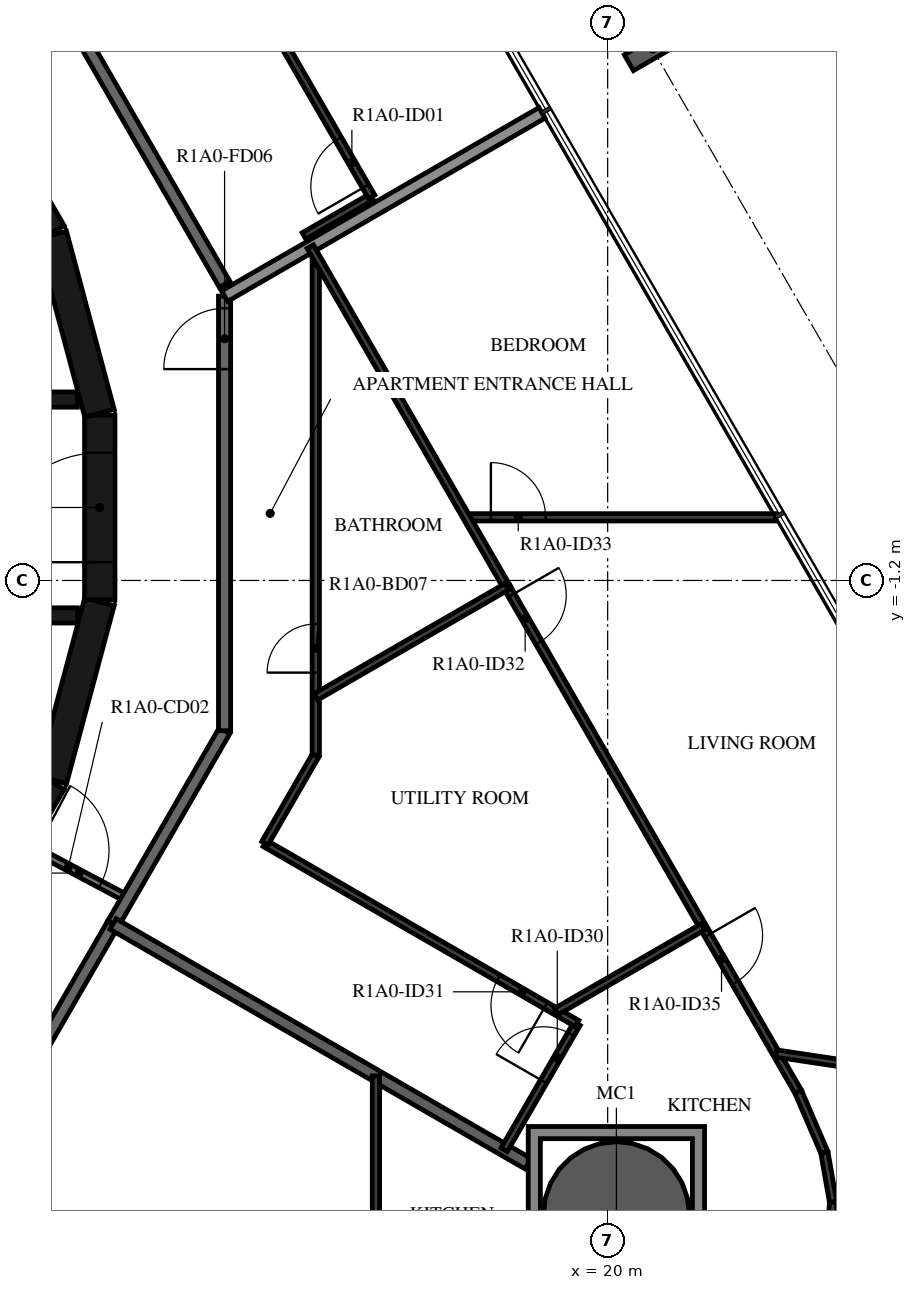
"""IFC4 building model, lengths in metres.
Left out: names, types, materials, properties, quantities, classifications, styles, units other than length and angle.
Written with IfcOpenShell. Run it as: python <this file> out.ifc"""

import sys

from ifc_helpers import new_model, si_unit, direction, frame, frame_2d, origin, origin_2d, place, context, subcontext, project, spatial, polyline, rectangle, hollow_circle, i_section, outline, extrude, element, fill, save


model = new_model("IFC4")
c1 = context("Model", 3, precision=1e-05, world=origin(), true_north=direction((0.0, 1.0)))
c2 = subcontext(c1, "Body", "Model", "MODEL_VIEW")
j1 = project(units=[si_unit("LENGTHUNIT", "METRE"), si_unit("PLANEANGLEUNIT", "RADIAN")], contexts=[c1])
p1 = place(None, origin())
s1 = spatial("IfcSite", under=j1, at=p1, CompositionType="ELEMENT")
p2 = place(p1, origin())
s2 = spatial("IfcBuilding", under=s1, at=p2, CompositionType="ELEMENT")
p3 = place(p2, frame((0.0, 0.0, 38.4)))
s3 = spatial("IfcBuildingStorey", under=s2, at=p3, CompositionType="ELEMENT", Elevation=38.4)
p4 = place(p3, frame((20.144, -11.63, -0.45), z_axis=(0.0, 0.0, 1.0), x_axis=(1.0, 0.0, 0.0)))
e1 = element("IfcColumn", 1, at=p4, inside=s3, PredefinedType="COLUMN", context=c2, shape_type="SweptSolid", body=[
    extrude(hollow_circle(Radius=1.2, WallThickness=0.06, at=origin_2d()), origin(), (0.0, 0.0, 1.0), 3.57),
])
p5 = place(p3, frame((20.739, 7.539, -0.45), z_axis=(0.0, 0.0, 1.0), x_axis=(0.50000017485, -0.866025302835, 0.0)))
e2 = element("IfcColumn", 2, at=p5, inside=s3, PredefinedType="COLUMN", context=c2, shape_type="SweptSolid", body=[
    extrude(i_section(OverallWidth=0.3, OverallDepth=0.9, WebThickness=0.019, FlangeThickness=0.035, FilletRadius=0.03, at=origin_2d()), origin(), (0.0, 0.0, 1.0), 3.57),
])
for number, where, z_axis, x_axis in (
    (3, (9.329, -7.137, 0.0), (0.0, 0.0, 1.0), (0.5, 0.866, 0.0)),
    (4, (10.858, -4.479, 0.0), (0.0, 0.0, 1.0), (0.259, 0.966, 0.0)),
):
    element("IfcWall", number, at=place(p3, frame(where, z_axis=z_axis, x_axis=x_axis)), inside=s3, PredefinedType="SHEAR", context=c2, shape_type="SweptSolid", body=[
        extrude(rectangle(XDim=3.033, YDim=0.5, at=frame_2d((1.516, 0.0))), origin(), (0.0, 0.0, 1.0), 3.12),
    ])
p6 = place(p3, frame((11.647, -1.516, 0.0), z_axis=(0.0, 0.0, 1.0), x_axis=(0.0, 1.0, 0.0)))
e5 = element("IfcWall", 5, at=p6, inside=s3, PredefinedType="SHEAR", context=c2, shape_type="SweptSolid", body=[
    extrude(rectangle(XDim=3.033, YDim=0.5, at=frame_2d((1.516, 0.0))), origin(), (0.0, 0.0, 1.0), 3.12),
])
p7 = place(p6, frame((0.616, 0.0, 0.0)))
e6 = element("IfcOpeningElement", 6, at=p7, cuts=e5, PredefinedType="OPENING", context=c2, shape_type="SweptSolid", body=[
    extrude(rectangle(XDim=1.8, YDim=2.1, at=frame_2d((0.9, 1.05))), frame((0.0, 0.26, 0.0), z_axis=(0.0, -1.0, 0.0), x_axis=(1.0, 0.0, 0.0)), (0.0, 0.0, 1.0), 0.52),
])
for number, where, z_axis, x_axis in (
    (7, (11.643, 1.55, 0.0), (0.0, 0.0, 1.0), (-0.259, 0.966, 0.0)),
    (8, (10.845, 4.51, 0.0), (0.0, 0.0, 1.0), (-0.5, 0.866, 0.0)),
):
    element("IfcWall", number, at=place(p3, frame(where, z_axis=z_axis, x_axis=x_axis)), inside=s3, PredefinedType="SHEAR", context=c2, shape_type="SweptSolid", body=[
        extrude(rectangle(XDim=3.033, YDim=0.5, at=frame_2d((1.516, 0.0))), origin(), (0.0, 0.0, 1.0), 3.12),
    ])
p8 = place(p3, frame((3.35, 1.775, 0.0), z_axis=(0.0, 0.0, 1.0), x_axis=(1.0, 0.0, 0.0)))
e9 = element("IfcWall", 9, at=p8, inside=s3, PredefinedType="SHEAR", context=c2, shape_type="SweptSolid", body=[
    extrude(rectangle(XDim=7.93, YDim=0.25, at=frame_2d((3.965, 0.0))), origin(), (0.0, 0.0, 1.0), 3.12),
])
p9 = place(p8, frame((0.35, 0.0, 0.0)))
e10 = element("IfcOpeningElement", 10, at=p9, cuts=e9, PredefinedType="OPENING", context=c2, shape_type="SweptSolid", body=[
    extrude(rectangle(XDim=1.2, YDim=2.4, at=frame_2d((0.6, 1.2))), frame((0.0, 0.135, 0.0), z_axis=(0.0, -1.0, 0.0), x_axis=(1.0, 0.0, 0.0)), (0.0, 0.0, 1.0), 0.27),
])
p10 = place(p8, frame((2.5, 0.0, 0.0)))
e11 = element("IfcOpeningElement", 11, at=p10, cuts=e9, PredefinedType="OPENING", context=c2, shape_type="SweptSolid", body=[
    extrude(rectangle(XDim=1.2, YDim=2.4, at=frame_2d((0.6, 1.2))), frame((0.0, 0.135, 0.0), z_axis=(0.0, -1.0, 0.0), x_axis=(1.0, 0.0, 0.0)), (0.0, 0.0, 1.0), 0.27),
])
p11 = place(p8, frame((4.8, 0.0, 0.0)))
e12 = element("IfcOpeningElement", 12, at=p11, cuts=e9, PredefinedType="OPENING", context=c2, shape_type="SweptSolid", body=[
    extrude(rectangle(XDim=0.9, YDim=2.1, at=frame_2d((0.45, 1.05))), frame((0.0, 0.135, 0.0), z_axis=(0.0, -1.0, 0.0), x_axis=(1.0, 0.0, 0.0)), (0.0, 0.0, 1.0), 0.27),
])
p12 = place(p3, frame((3.35, -1.775, 0.0), z_axis=(0.0, 0.0, 1.0), x_axis=(1.0, 0.0, 0.0)))
e13 = element("IfcWall", 13, at=p12, inside=s3, PredefinedType="SHEAR", context=c2, shape_type="SweptSolid", body=[
    extrude(rectangle(XDim=7.93, YDim=0.25, at=frame_2d((3.965, 0.0))), origin(), (0.0, 0.0, 1.0), 3.12),
])
p13 = place(p12, frame((0.4, 0.0, 0.0)))
e14 = element("IfcOpeningElement", 14, at=p13, cuts=e13, PredefinedType="OPENING", context=c2, shape_type="SweptSolid", body=[
    extrude(rectangle(XDim=1.1, YDim=2.4, at=frame_2d((0.55, 1.2))), frame((0.0, 0.135, 0.0), z_axis=(0.0, -1.0, 0.0), x_axis=(1.0, 0.0, 0.0)), (0.0, 0.0, 1.0), 0.27),
])
p14 = place(p12, frame((2.55, 0.0, 0.0)))
e15 = element("IfcOpeningElement", 15, at=p14, cuts=e13, PredefinedType="OPENING", context=c2, shape_type="SweptSolid", body=[
    extrude(rectangle(XDim=1.1, YDim=2.4, at=frame_2d((0.55, 1.2))), frame((0.0, 0.135, 0.0), z_axis=(0.0, -1.0, 0.0), x_axis=(1.0, 0.0, 0.0)), (0.0, 0.0, 1.0), 0.27),
])
p15 = place(p12, frame((4.7, 0.0, 0.0)))
e16 = element("IfcOpeningElement", 16, at=p15, cuts=e13, PredefinedType="OPENING", context=c2, shape_type="SweptSolid", body=[
    extrude(rectangle(XDim=1.1, YDim=2.4, at=frame_2d((0.55, 1.2))), frame((0.0, 0.135, 0.0), z_axis=(0.0, -1.0, 0.0), x_axis=(1.0, 0.0, 0.0)), (0.0, 0.0, 1.0), 0.27),
])
p16 = place(p3, frame((10.511, -5.589, 0.0), z_axis=(0.0, 0.0, 1.0), x_axis=(0.88294043061, -0.469485032769, 0.0)))
e17 = element("IfcWall", 17, at=p16, inside=s3, PredefinedType="PARTITIONING", context=c2, shape_type="SweptSolid", body=[
    extrude(rectangle(XDim=1.804, YDim=0.12, at=frame_2d((0.902, 0.0))), origin(), (0.0, 0.0, 1.0), 3.12),
])
p17 = place(p16, frame((0.1, 0.0, 0.0)))
e18 = element("IfcOpeningElement", 18, at=p17, cuts=e17, PredefinedType="OPENING", context=c2, shape_type="SweptSolid", body=[
    extrude(rectangle(XDim=1.2, YDim=2.1, at=frame_2d((0.6, 1.05))), frame((0.0, 0.07, 0.0), z_axis=(0.0, -1.0, 0.0), x_axis=(1.0, 0.0, 0.0)), (0.0, 0.0, 1.0), 0.14),
])
p18 = place(p3, frame((13.7, 3.671, 0.0), z_axis=(0.0, 0.0, 1.0), x_axis=(-0.500001669485, 0.866024439905, 0.0)))
e19 = element("IfcWall", 19, at=p18, inside=s3, PredefinedType="STANDARD", context=c2, shape_type="SweptSolid", body=[
    extrude(rectangle(XDim=7.342, YDim=0.2, at=frame_2d((3.671, 0.0))), origin(), (0.0, 0.0, 1.0), 3.12),
])
p19 = place(p18, frame((6.142, 0.0, 0.0)))
e20 = element("IfcOpeningElement", 20, at=p19, cuts=e19, PredefinedType="OPENING", context=c2, shape_type="SweptSolid", body=[
    extrude(rectangle(XDim=1.0, YDim=2.1, at=frame_2d((0.5, 1.05))), frame((0.0, 0.11, 0.0), z_axis=(0.0, -1.0, 0.0), x_axis=(1.0, 0.0, 0.0)), (0.0, 0.0, 1.0), 0.22),
])
p20 = place(p3, frame((11.865, -6.849, 0.0), z_axis=(0.0, 0.0, 1.0), x_axis=(0.500002704028, 0.866023842607, 0.0)))
e21 = element("IfcWall", 21, at=p20, inside=s3, PredefinedType="STANDARD", context=c2, shape_type="SweptSolid", body=[
    extrude(rectangle(XDim=3.67, YDim=0.2, at=frame_2d((1.835, 0.0))), origin(), (0.0, 0.0, 1.0), 3.12),
])
p21 = place(p3, frame((13.7, -3.671, 0.0), z_axis=(0.0, 0.0, 1.0), x_axis=(0.0, 1.0, 0.0)))
e22 = element("IfcWall", 22, at=p21, inside=s3, PredefinedType="STANDARD", context=c2, shape_type="SweptSolid", body=[
    extrude(rectangle(XDim=7.146, YDim=0.2, at=frame_2d((3.573, 0.0))), origin(), (0.0, 0.0, 1.0), 3.12),
])
p22 = place(p21, frame((5.947, 0.0, 0.0)))
e23 = element("IfcOpeningElement", 23, at=p22, cuts=e22, PredefinedType="OPENING", context=c2, shape_type="SweptSolid", body=[
    extrude(rectangle(XDim=1.0, YDim=2.1, at=frame_2d((0.5, 1.05))), frame((0.0, 0.11, 0.0), z_axis=(0.0, -1.0, 0.0), x_axis=(1.0, 0.0, 0.0)), (0.0, 0.0, 1.0), 0.22),
])
p23 = place(p3, frame((10.029, -10.029, 0.0), z_axis=(0.0, 0.0, 1.0), x_axis=(0.50001606911, 0.866016126081, 0.0)))
e24 = element("IfcWall", 24, at=p23, inside=s3, PredefinedType="STANDARD", context=c2, shape_type="SweptSolid", body=[
    extrude(rectangle(XDim=3.671, YDim=0.2, at=frame_2d((1.835, 0.0))), origin(), (0.0, 0.0, 1.0), 3.12),
])
p24 = place(p3, frame((13.7, 3.476, 0.0), z_axis=(0.0, 0.0, 1.0), x_axis=(0.866013584312, 0.500020471368, 0.0)))
e25 = element("IfcWall", 25, at=p24, inside=s3, PredefinedType="STANDARD", context=c2, shape_type="SweptSolid", body=[
    extrude(rectangle(XDim=6.028, YDim=0.2, at=frame_2d((3.014, 0.0))), origin(), (0.0, 0.0, 1.0), 2.73),
])
p25 = place(p3, frame((18.694, -10.793, 0.0), z_axis=(0.0, 0.0, 1.0), x_axis=(-0.865964895271, 0.500104789178, 0.0)))
e26 = element("IfcWall", 26, at=p25, inside=s3, PredefinedType="STANDARD", context=c2, shape_type="SweptSolid", body=[
    extrude(rectangle(XDim=7.885, YDim=0.2, at=frame_2d((3.943, 0.0))), origin(), (0.0, 0.0, 1.0), 3.12),
])
p26 = place(p3, frame((15.007, 4.467, 0.0), z_axis=(0.0, 0.0, 1.0), x_axis=(0.86599869919, 0.500046250861, 0.0)))
e27 = element("IfcWall", 27, at=p26, inside=s3, PredefinedType="PARTITIONING", context=c2, shape_type="SweptSolid", body=[
    extrude(rectangle(XDim=1.284, YDim=0.12, at=frame_2d((0.642, 0.0))), origin(), (0.0, 0.0, 1.0), 3.12),
])
p27 = place(p3, frame((16.119, 5.109, 0.0), z_axis=(0.0, 0.0, 1.0), x_axis=(-0.499988222896, 0.866032203192, 0.0)))
e28 = element("IfcWall", 28, at=p27, inside=s3, PredefinedType="PARTITIONING", context=c2, shape_type="SweptSolid", body=[
    extrude(rectangle(XDim=4.4, YDim=0.12, at=frame_2d((2.2, 0.0))), origin(), (0.0, 0.0, 1.0), 3.12),
])
p28 = place(p27, frame((0.2, 0.0, 0.0)))
e29 = element("IfcOpeningElement", 29, at=p28, cuts=e28, PredefinedType="OPENING", context=c2, shape_type="SweptSolid", body=[
    extrude(rectangle(XDim=0.9, YDim=2.1, at=frame_2d((0.45, 1.05))), frame((0.0, 0.07, 0.0), z_axis=(0.0, -1.0, 0.0), x_axis=(1.0, 0.0, 0.0)), (0.0, 0.0, 1.0), 0.14),
])
p29 = place(p3, frame((16.189, -15.23, 0.0), z_axis=(0.0, 0.0, 1.0), x_axis=(0.0, 1.0, 0.0)))
e30 = element("IfcWall", 30, at=p29, inside=s3, PredefinedType="PARTITIONING", context=c2, shape_type="SweptSolid", body=[
    extrude(rectangle(XDim=5.883, YDim=0.12, at=frame_2d((2.942, 0.0))), origin(), (0.0, 0.0, 1.0), 3.12),
])
p30 = place(p29, frame((0.2, 0.0, 0.0)))
e31 = element("IfcOpeningElement", 31, at=p30, cuts=e30, PredefinedType="OPENING", context=c2, shape_type="SweptSolid", body=[
    extrude(rectangle(XDim=0.9, YDim=2.1, at=frame_2d((0.45, 1.05))), frame((0.0, 0.07, 0.0), z_axis=(0.0, -1.0, 0.0), x_axis=(1.0, 0.0, 0.0)), (0.0, 0.0, 1.0), 0.14),
])
p31 = place(p3, frame((18.298, -10.564, 0.0), z_axis=(0.0, 0.0, 1.0), x_axis=(0.499960392047, 0.866048270239, 0.0)))
e32 = element("IfcWall", 32, at=p31, inside=s3, PredefinedType="PARTITIONING", context=c2, shape_type="SweptSolid", body=[
    extrude(rectangle(XDim=2.398, YDim=0.12, at=frame_2d((1.199, 0.0))), origin(), (0.0, 0.0, 1.0), 3.12),
])
p32 = place(p31, frame((1.298, 0.0, 0.0)))
e33 = element("IfcOpeningElement", 33, at=p32, cuts=e32, PredefinedType="OPENING", context=c2, shape_type="SweptSolid", body=[
    extrude(rectangle(XDim=0.9, YDim=2.1, at=frame_2d((0.45, 1.05))), frame((0.0, 0.07, 0.0), z_axis=(0.0, -1.0, 0.0), x_axis=(1.0, 0.0, 0.0)), (0.0, 0.0, 1.0), 0.14),
])
p33 = place(p3, frame((19.497, -8.487, 0.0), z_axis=(0.0, 0.0, 1.0), x_axis=(-0.866027165828, 0.499996948039, 0.0)))
e34 = element("IfcWall", 34, at=p33, inside=s3, PredefinedType="PARTITIONING", context=c2, shape_type="SweptSolid", body=[
    extrude(rectangle(XDim=5.928, YDim=0.12, at=frame_2d((2.964, 0.0))), origin(), (0.0, 0.0, 1.0), 3.12),
])
p34 = place(p33, frame((0.595, 0.0, 0.0)))
e35 = element("IfcOpeningElement", 35, at=p34, cuts=e34, PredefinedType="OPENING", context=c2, shape_type="SweptSolid", body=[
    extrude(rectangle(XDim=0.9, YDim=2.1, at=frame_2d((0.45, 1.05))), frame((0.0, 0.07, 0.0), z_axis=(0.0, -1.0, 0.0), x_axis=(1.0, 0.0, 0.0)), (0.0, 0.0, 1.0), 0.14),
])
p35 = place(p3, frame((14.363, -5.523, 0.0), z_axis=(0.0, 0.0, 1.0), x_axis=(0.499995851058, 0.866027799164, 0.0)))
e36 = element("IfcWall", 36, at=p35, inside=s3, PredefinedType="PARTITIONING", context=c2, shape_type="SweptSolid", body=[
    extrude(rectangle(XDim=1.675, YDim=0.12, at=frame_2d((0.837, 0.0))), origin(), (0.0, 0.0, 1.0), 3.12),
])
p36 = place(p3, frame((15.2, -4.073, 0.0), z_axis=(0.0, 0.0, 1.0), x_axis=(0.0, 1.0, 0.0)))
e37 = element("IfcWall", 37, at=p36, inside=s3, PredefinedType="PARTITIONING", context=c2, shape_type="SweptSolid", body=[
    extrude(rectangle(XDim=8.146, YDim=0.12, at=frame_2d((4.073, 0.0))), origin(), (0.0, 0.0, 1.0), 3.12),
])
p37 = place(p36, frame((1.357, 0.0, 0.0)))
e38 = element("IfcOpeningElement", 38, at=p37, cuts=e37, PredefinedType="OPENING", context=c2, shape_type="SweptSolid", body=[
    extrude(rectangle(XDim=0.8, YDim=2.1, at=frame_2d((0.4, 1.05))), frame((0.0, 0.07, 0.0), z_axis=(0.0, -1.0, 0.0), x_axis=(1.0, 0.0, 0.0)), (0.0, 0.0, 1.0), 0.14),
])
p38 = place(p3, frame((17.679, -0.162, 0.0), z_axis=(0.0, 0.0, 1.0), x_axis=(1.0, 0.0, 0.0)))
e39 = element("IfcWall", 39, at=p38, inside=s3, PredefinedType="PARTITIONING", context=c2, shape_type="SweptSolid", body=[
    extrude(rectangle(XDim=5.081, YDim=0.12, at=frame_2d((2.54, 0.0))), origin(), (0.0, 0.0, 1.0), 3.12),
])
p39 = place(p38, frame((0.4, 0.0, 0.0)))
e40 = element("IfcOpeningElement", 40, at=p39, cuts=e39, PredefinedType="OPENING", context=c2, shape_type="SweptSolid", body=[
    extrude(rectangle(XDim=0.9, YDim=2.1, at=frame_2d((0.45, 1.05))), frame((0.0, 0.07, 0.0), z_axis=(0.0, -1.0, 0.0), x_axis=(1.0, 0.0, 0.0)), (0.0, 0.0, 1.0), 0.14),
])
p40 = place(p3, frame((15.11, 4.289, 0.0), z_axis=(0.0, 0.0, 1.0), x_axis=(0.500001702147, -0.866024421047, 0.0)))
e41 = element("IfcWall", 41, at=p40, inside=s3, PredefinedType="PARTITIONING", context=c2, shape_type="SweptSolid", body=[
    extrude(rectangle(XDim=6.458, YDim=0.12, at=frame_2d((3.229, 0.0))), origin(), (0.0, 0.0, 1.0), 3.12),
])
p41 = place(p3, frame((18.339, -1.303, 0.0), z_axis=(0.0, 0.0, 1.0), x_axis=(0.499989127021, -0.866031681211, 0.0)))
e42 = element("IfcWall", 42, at=p41, inside=s3, PredefinedType="PARTITIONING", context=c2, shape_type="SweptSolid", body=[
    extrude(rectangle(XDim=9.589, YDim=0.12, at=frame_2d((4.794, 0.0))), origin(), (0.0, 0.0, 1.0), 3.12),
])
p42 = place(p41, frame((0.16, 0.0, 0.0)))
e43 = element("IfcOpeningElement", 43, at=p42, cuts=e42, PredefinedType="OPENING", context=c2, shape_type="SweptSolid", body=[
    extrude(rectangle(XDim=0.9, YDim=2.1, at=frame_2d((0.45, 1.05))), frame((0.0, 0.07, 0.0), z_axis=(0.0, -1.0, 0.0), x_axis=(1.0, 0.0, 0.0)), (0.0, 0.0, 1.0), 0.14),
])
p43 = place(p41, frame((6.618, 0.0, 0.0)))
e44 = element("IfcOpeningElement", 44, at=p43, cuts=e42, PredefinedType="OPENING", context=c2, shape_type="SweptSolid", body=[
    extrude(rectangle(XDim=0.9, YDim=2.1, at=frame_2d((0.45, 1.05))), frame((0.0, 0.07, 0.0), z_axis=(0.0, -1.0, 0.0), x_axis=(1.0, 0.0, 0.0)), (0.0, 0.0, 1.0), 0.14),
])
p44 = place(p3, frame((23.133, -9.608, 0.0), z_axis=(0.0, 0.0, 1.0), x_axis=(0.396195073027, -0.918166359713, 0.0)))
e45 = element("IfcWall", 45, at=p44, inside=s3, PredefinedType="PARTITIONING", context=c2, shape_type="SweptSolid", body=[
    extrude(rectangle(XDim=1.087, YDim=0.12, at=frame_2d((0.543, 0.0))), origin(), (0.0, 0.0, 1.0), 3.12),
])
for number, where, z_axis, x_axis in (
    (46, (23.564, -10.606, 0.0), (0.0, 0.0, 1.0), (0.173, -0.985, 0.0)),
    (47, (23.708, -11.422, 0.0), (0.0, 0.0, 1.0), (-0.058, -0.998, 0.0)),
):
    element("IfcWall", number, at=place(p3, frame(where, z_axis=z_axis, x_axis=x_axis)), inside=s3, PredefinedType="PARTITIONING", context=c2, shape_type="SweptSolid", body=[
        extrude(rectangle(XDim=0.829, YDim=0.12, at=frame_2d((0.415, 0.0))), origin(), (0.0, 0.0, 1.0), 3.12),
    ])
p45 = place(p3, frame((27.88, -9.747, 0.0), z_axis=(0.0, 0.0, 1.0), x_axis=(-0.988899241625, 0.14858765061, 0.0)))
e48 = element("IfcWall", 48, at=p45, inside=s3, PredefinedType="PARTITIONING", context=c2, shape_type="SweptSolid", body=[
    extrude(rectangle(XDim=5.167, YDim=0.12, at=frame_2d((2.584, 0.0))), origin(), (0.0, 0.0, 1.0), 3.12),
])
p46 = place(p45, frame((0.4, 0.0, 0.0)))
e49 = element("IfcOpeningElement", 49, at=p46, cuts=e48, PredefinedType="OPENING", context=c2, shape_type="SweptSolid", body=[
    extrude(rectangle(XDim=0.9, YDim=2.1, at=frame_2d((0.45, 1.05))), frame((0.0, 0.07, 0.0), z_axis=(0.0, -1.0, 0.0), x_axis=(1.0, 0.0, 0.0)), (0.0, 0.0, 1.0), 0.14),
])
p47 = place(p3, frame((21.568, -6.896, 0.0), z_axis=(0.0, 0.0, 1.0), x_axis=(-0.866029478545, -0.499992942241, 0.0)))
e50 = element("IfcWall", 50, at=p47, inside=s3, PredefinedType="PARTITIONING", context=c2, shape_type="SweptSolid", body=[
    extrude(rectangle(XDim=2.787, YDim=0.12, at=frame_2d((1.393, 0.0))), origin(), (0.0, 0.0, 1.0), 3.12),
])
p48 = place(p3, frame((18.339, -1.303, 0.0), z_axis=(0.0, 0.0, 1.0), x_axis=(-0.866037510713, -0.499979029598, 0.0)))
e51 = element("IfcWall", 51, at=p48, inside=s3, PredefinedType="PARTITIONING", context=c2, shape_type="SweptSolid", body=[
    extrude(rectangle(XDim=3.624, YDim=0.12, at=frame_2d((1.812, 0.0))), origin(), (0.0, 0.0, 1.0), 3.12),
])
p49 = place(p3, origin())
e52 = element("IfcWall", 52, at=p49, inside=s3, PredefinedType="STANDARD", context=c2, shape_type="SweptSolid", body=[
    extrude(outline(polyline([(21.594, -10.18), (21.594, -13.08), (18.694, -13.08), (18.694, -10.18), (21.594, -10.18)]), holes=[polyline([(18.894, -12.88), (21.394, -12.88), (21.394, -10.38), (18.894, -10.38), (18.894, -12.88)])]), origin(), (0.0, 0.0, 1.0), 3.12),
])
p50 = place(p7, origin())
e53 = element("IfcDoor", 53, at=p50, inside=s3, OperationType="DOUBLE_DOOR_SINGLE_SWING", PredefinedType="DOOR", context=c2, shape_type="SweptSolid", body=[
    extrude(rectangle(XDim=1.8, YDim=2.1, at=frame_2d((0.9, 1.05))), frame((0.0, 0.025, 0.0), z_axis=(0.0, -1.0, 0.0), x_axis=(1.0, 0.0, 0.0)), (0.0, 0.0, 1.0), 0.05),
])
fill(e6, e53)
p51 = place(p28, origin())
e54 = element("IfcDoor", 54, at=p51, inside=s3, OperationType="SINGLE_SWING_LEFT", PredefinedType="DOOR", context=c2, shape_type="SweptSolid", body=[
    extrude(rectangle(XDim=0.9, YDim=2.1, at=frame_2d((0.45, 1.05))), frame((0.0, 0.025, 0.0), z_axis=(0.0, -1.0, 0.0), x_axis=(1.0, 0.0, 0.0)), (0.0, 0.0, 1.0), 0.05),
])
fill(e29, e54)
p52 = place(p22, origin())
e55 = element("IfcDoor", 55, at=p52, inside=s3, OperationType="SINGLE_SWING_LEFT", PredefinedType="DOOR", context=c2, shape_type="SweptSolid", body=[
    extrude(rectangle(XDim=1.0, YDim=2.1, at=frame_2d((0.5, 1.05))), frame((0.0, 0.025, 0.0), z_axis=(0.0, -1.0, 0.0), x_axis=(1.0, 0.0, 0.0)), (0.0, 0.0, 1.0), 0.05),
])
fill(e23, e55)
p53 = place(p32, origin())
e56 = element("IfcDoor", 56, at=p53, inside=s3, OperationType="SINGLE_SWING_LEFT", PredefinedType="DOOR", context=c2, shape_type="SweptSolid", body=[
    extrude(rectangle(XDim=0.9, YDim=2.1, at=frame_2d((0.45, 1.05))), frame((0.0, 0.025, 0.0), z_axis=(0.0, -1.0, 0.0), x_axis=(1.0, 0.0, 0.0)), (0.0, 0.0, 1.0), 0.05),
])
fill(e33, e56)
p54 = place(p34, origin())
e57 = element("IfcDoor", 57, at=p54, inside=s3, OperationType="SINGLE_SWING_LEFT", PredefinedType="DOOR", context=c2, shape_type="SweptSolid", body=[
    extrude(rectangle(XDim=0.9, YDim=2.1, at=frame_2d((0.45, 1.05))), frame((0.0, 0.025, 0.0), z_axis=(0.0, -1.0, 0.0), x_axis=(1.0, 0.0, 0.0)), (0.0, 0.0, 1.0), 0.05),
])
fill(e35, e57)
p55 = place(p37, origin())
e58 = element("IfcDoor", 58, at=p55, inside=s3, OperationType="SINGLE_SWING_LEFT", PredefinedType="DOOR", context=c2, shape_type="SweptSolid", body=[
    extrude(rectangle(XDim=0.8, YDim=2.1, at=frame_2d((0.4, 1.05))), frame((0.0, 0.025, 0.0), z_axis=(0.0, -1.0, 0.0), x_axis=(1.0, 0.0, 0.0)), (0.0, 0.0, 1.0), 0.05),
])
fill(e38, e58)
p56 = place(p42, origin())
e59 = element("IfcDoor", 59, at=p56, inside=s3, OperationType="SINGLE_SWING_LEFT", PredefinedType="DOOR", context=c2, shape_type="SweptSolid", body=[
    extrude(rectangle(XDim=0.9, YDim=2.1, at=frame_2d((0.45, 1.05))), frame((0.0, 0.025, 0.0), z_axis=(0.0, -1.0, 0.0), x_axis=(1.0, 0.0, 0.0)), (0.0, 0.0, 1.0), 0.05),
])
fill(e43, e59)
p57 = place(p39, origin())
e60 = element("IfcDoor", 60, at=p57, inside=s3, OperationType="SINGLE_SWING_LEFT", PredefinedType="DOOR", context=c2, shape_type="SweptSolid", body=[
    extrude(rectangle(XDim=0.9, YDim=2.1, at=frame_2d((0.45, 1.05))), frame((0.0, 0.025, 0.0), z_axis=(0.0, -1.0, 0.0), x_axis=(1.0, 0.0, 0.0)), (0.0, 0.0, 1.0), 0.05),
])
fill(e40, e60)
p58 = place(p43, origin())
e61 = element("IfcDoor", 61, at=p58, inside=s3, OperationType="SINGLE_SWING_RIGHT", PredefinedType="DOOR", context=c2, shape_type="SweptSolid", body=[
    extrude(rectangle(XDim=0.9, YDim=2.1, at=frame_2d((0.45, 1.05))), frame((0.0, 0.025, 0.0), z_axis=(0.0, -1.0, 0.0), x_axis=(1.0, 0.0, 0.0)), (0.0, 0.0, 1.0), 0.05),
])
fill(e44, e61)
p59 = place(p17, origin())
e62 = element("IfcDoor", 62, at=p59, inside=s3, OperationType="DOUBLE_DOOR_SINGLE_SWING", PredefinedType="DOOR", context=c2, shape_type="SweptSolid", body=[
    extrude(rectangle(XDim=1.2, YDim=2.1, at=frame_2d((0.6, 1.05))), frame((0.0, 0.025, 0.0), z_axis=(0.0, -1.0, 0.0), x_axis=(1.0, 0.0, 0.0)), (0.0, 0.0, 1.0), 0.05),
])
fill(e18, e62)
save(model, sys.argv[1])
